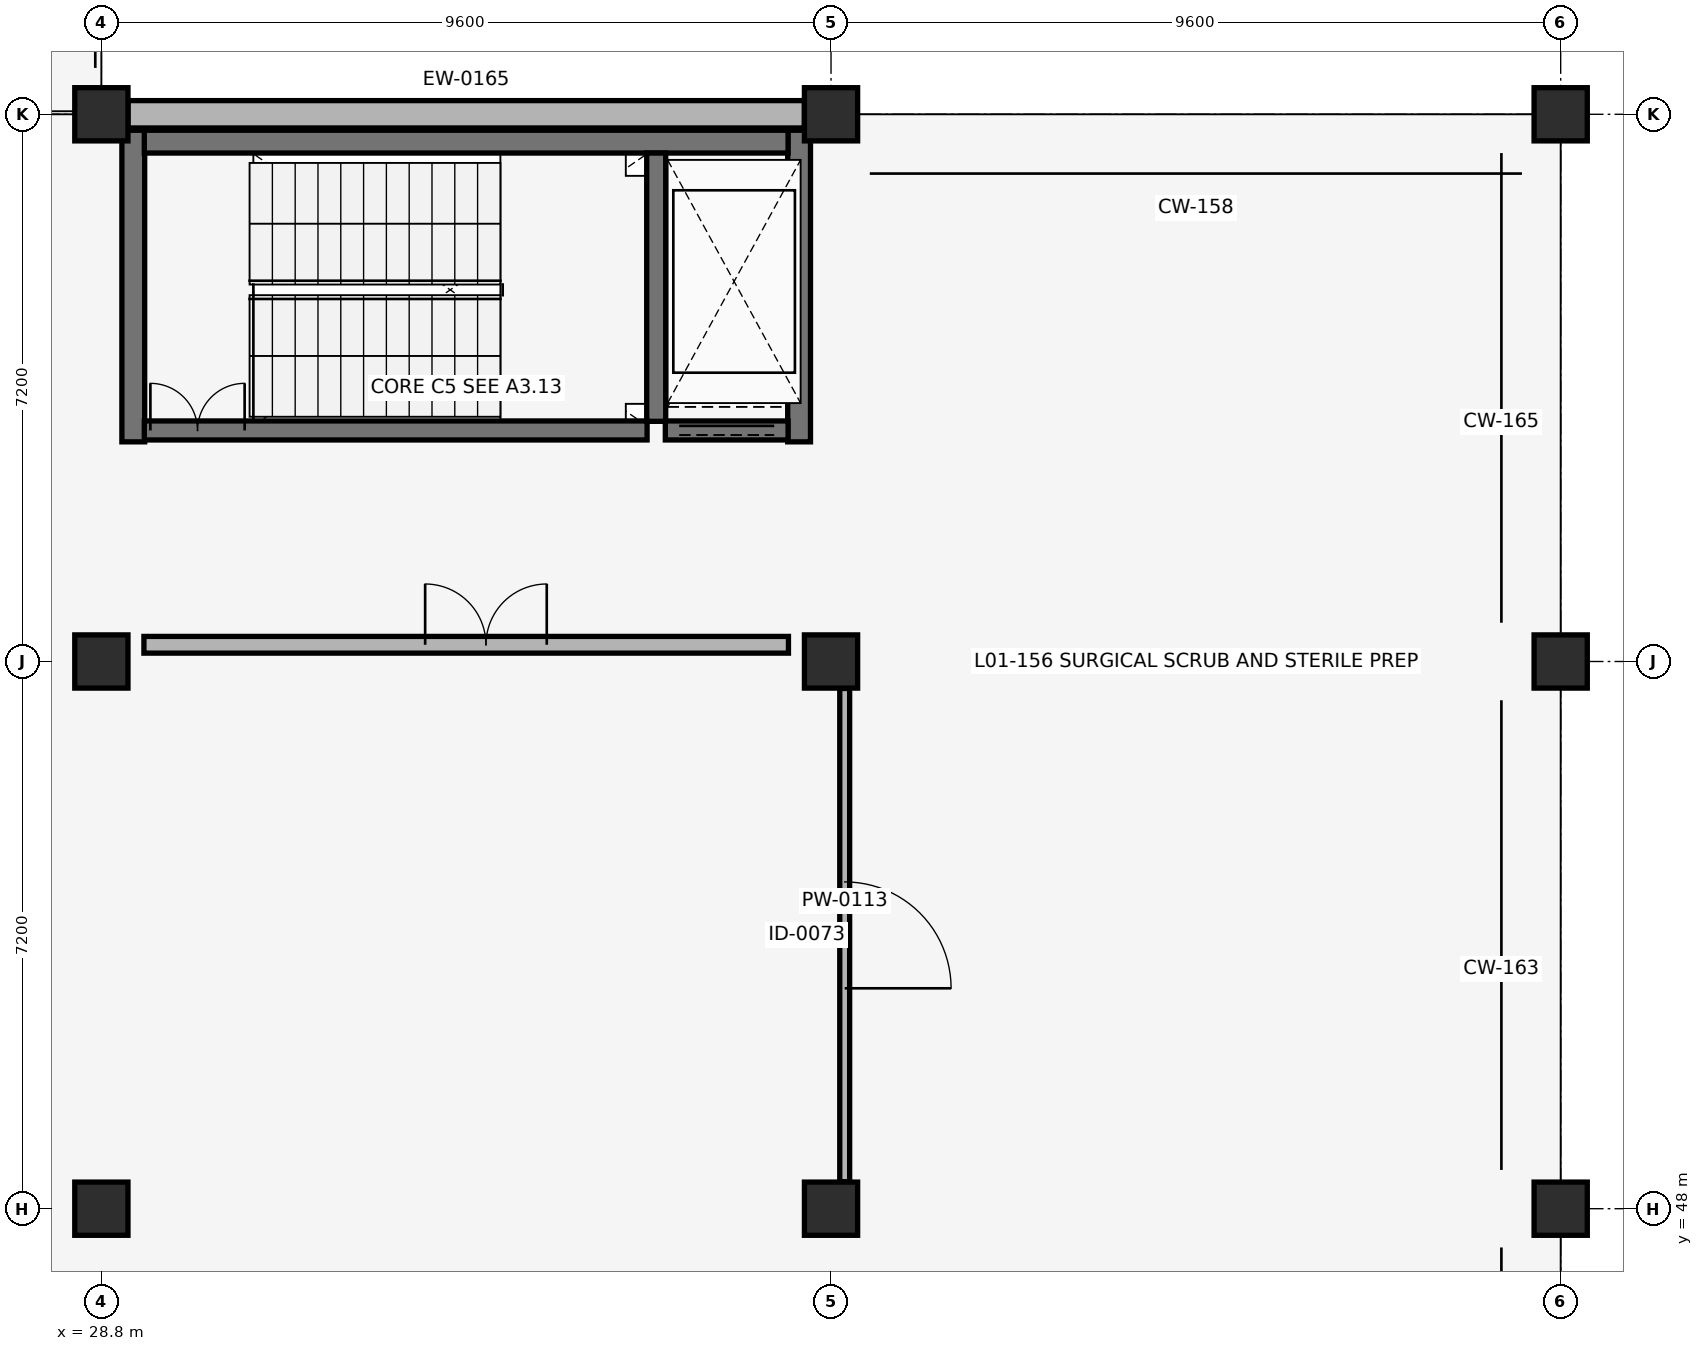
"""IFC4 building model, lengths in metres.
Left out: names, types, materials, properties, quantities, classifications, styles, units other than length and angle.
Written with IfcOpenShell. Run it as: python <this file> out.ifc"""

import sys

from ifc_helpers import new_model, si_unit, direction, frame, frame_2d, origin, origin_2d, place, context, subcontext, project, spatial, rectangle, circle, extrude, element, fill, save


model = new_model("IFC4")
c1 = context("Model", 3, precision=1e-05, world=origin(), true_north=direction((0.0, 1.0)))
c2 = subcontext(c1, "Body", "Model", "MODEL_VIEW")
j1 = project(units=[si_unit("LENGTHUNIT", "METRE"), si_unit("PLANEANGLEUNIT", "RADIAN")], contexts=[c1])
p1 = place(None, origin())
s1 = spatial("IfcSite", under=j1, at=p1, CompositionType="ELEMENT")
p2 = place(p1, origin())
s2 = spatial("IfcBuilding", under=s1, at=p2, CompositionType="ELEMENT")
p3 = place(p2, frame((0.0, 0.0, 4.42)))
s3 = spatial("IfcBuildingStorey", under=s2, at=p3, CompositionType="ELEMENT", Elevation=4.42)
for number, where, z_axis, x_axis in (
    (1, (28.8, 48.0, 0.0), (0.0, 0.0, 1.0), (1.0, 0.0, 0.0)),
    (2, (28.8, 55.2, 0.0), (0.0, 0.0, 1.0), (1.0, 0.0, 0.0)),
    (3, (28.8, 62.4, 0.0), (0.0, 0.0, 1.0), (1.0, 0.0, 0.0)),
    (4, (38.4, 48.0, 0.0), (0.0, 0.0, 1.0), (1.0, 0.0, 0.0)),
    (5, (38.4, 55.2, 0.0), (0.0, 0.0, 1.0), (1.0, 0.0, 0.0)),
    (6, (38.4, 62.4, 0.0), (0.0, 0.0, 1.0), (1.0, 0.0, 0.0)),
    (7, (48.0, 48.0, 0.0), (0.0, 0.0, 1.0), (1.0, 0.0, 0.0)),
    (8, (48.0, 55.2, 0.0), (0.0, 0.0, 1.0), (1.0, 0.0, 0.0)),
    (9, (48.0, 62.4, 0.0), (0.0, 0.0, 1.0), (1.0, 0.0, 0.0)),
):
    element("IfcColumn", number, at=place(p3, frame(where, z_axis=z_axis, x_axis=x_axis)), inside=s3, PredefinedType="COLUMN", context=c2, shape_type="SweptSolid", body=[
        extrude(circle(Radius=0.35, at=origin_2d()), origin(), (0.0, 0.0, 1.0), 4.08),
    ])
p4 = place(p3, frame((38.05, 62.4, 0.0), z_axis=(0.0, 0.0, 1.0), x_axis=(-1.0, 0.0, 0.0)))
e10 = element("IfcWall", 10, at=p4, inside=s3, PredefinedType="SOLIDWALL", context=c2, shape_type="SweptSolid", body=[
    extrude(rectangle(XDim=8.9, YDim=0.36, at=frame_2d((4.45, 0.0))), origin(), (0.0, 0.0, 1.0), 3.06),
])
for number, where, z_axis, x_axis in (
    (11, (29.22, 58.09, 0.0), (0.0, 0.0, 1.0), (0.0, 1.0, 0.0)),
    (12, (37.98, 58.09, 0.0), (0.0, 0.0, 1.0), (0.0, 1.0, 0.0)),
):
    element("IfcWall", number, at=place(p3, frame(where, z_axis=z_axis, x_axis=x_axis)), inside=s3, PredefinedType="SHEAR", context=c2, shape_type="SweptSolid", body=[
        extrude(rectangle(XDim=4.1, YDim=0.3, at=frame_2d((2.05, 0.0))), origin(), (0.0, 0.0, 1.0), 3.78),
    ])
p5 = place(p3, frame((29.365, 62.04, 0.0), z_axis=(0.0, 0.0, 1.0), x_axis=(1.0, 0.0, 0.0)))
e13 = element("IfcWall", 13, at=p5, inside=s3, PredefinedType="SHEAR", context=c2, shape_type="SweptSolid", body=[
    extrude(rectangle(XDim=8.47, YDim=0.3, at=frame_2d((4.235, 0.0))), origin(), (0.0, 0.0, 1.0), 3.78),
])
p6 = place(p3, frame((36.1, 58.36, 0.0), z_axis=(0.0, 0.0, 1.0), x_axis=(0.0, 1.0, 0.0)))
e14 = element("IfcWall", 14, at=p6, inside=s3, PredefinedType="SHEAR", context=c2, shape_type="SweptSolid", body=[
    extrude(rectangle(XDim=3.53, YDim=0.25, at=frame_2d((1.765, 0.0))), origin(), (0.0, 0.0, 1.0), 3.78),
])
p7 = place(p3, frame((29.365, 58.24, 0.0), z_axis=(0.0, 0.0, 1.0), x_axis=(1.0, 0.0, 0.0)))
e15 = element("IfcWall", 15, at=p7, inside=s3, PredefinedType="SHEAR", context=c2, shape_type="SweptSolid", body=[
    extrude(rectangle(XDim=6.615, YDim=0.25, at=frame_2d((3.308, 0.0))), origin(), (0.0, 0.0, 1.0), 3.78),
])
p8 = place(p7, frame((0.08, 0.0, 0.0)))
e16 = element("IfcOpeningElement", 16, at=p8, cuts=e15, PredefinedType="OPENING", context=c2, shape_type="SweptSolid", body=[
    extrude(rectangle(XDim=1.24, YDim=2.15, at=frame_2d((0.62, 1.075))), frame((0.0, 0.135, 0.0), z_axis=(0.0, -1.0, 0.0), x_axis=(1.0, 0.0, 0.0)), (0.0, 0.0, 1.0), 0.27),
])
p9 = place(p3, frame((29.36, 55.42, 0.0), z_axis=(0.0, 0.0, 1.0), x_axis=(1.0, 0.0, 0.0)))
e17 = element("IfcWall", 17, at=p9, inside=s3, PredefinedType="PARTITIONING", context=c2, shape_type="SweptSolid", body=[
    extrude(rectangle(XDim=8.48, YDim=0.22, at=frame_2d((4.24, 0.0))), origin(), (0.0, 0.0, 1.0), 3.11),
])
p10 = place(p9, frame((3.7, 0.0, 0.0)))
e18 = element("IfcOpeningElement", 18, at=p10, cuts=e17, PredefinedType="OPENING", context=c2, shape_type="SweptSolid", body=[
    extrude(rectangle(XDim=1.6, YDim=2.2, at=frame_2d((0.8, 1.1))), frame((0.0, 0.12, 0.0), z_axis=(0.0, -1.0, 0.0), x_axis=(1.0, 0.0, 0.0)), (0.0, 0.0, 1.0), 0.24),
])
p11 = place(p3, frame((36.22, 58.24, 0.0), z_axis=(0.0, 0.0, 1.0), x_axis=(1.0, 0.0, 0.0)))
e19 = element("IfcWall", 19, at=p11, inside=s3, PredefinedType="SHEAR", context=c2, shape_type="SweptSolid", body=[
    extrude(rectangle(XDim=1.615, YDim=0.25, at=frame_2d((0.808, 0.0))), origin(), (0.0, 0.0, 1.0), 3.78),
])
p12 = place(p11, frame((0.183, 0.0, 0.0)))
e20 = element("IfcOpeningElement", 20, at=p12, cuts=e19, PredefinedType="OPENING", context=c2, shape_type="SweptSolid", body=[
    extrude(rectangle(XDim=1.25, YDim=2.15, at=frame_2d((0.625, 1.075))), frame((0.0, 0.135, 0.0), z_axis=(0.0, -1.0, 0.0), x_axis=(1.0, 0.0, 0.0)), (0.0, 0.0, 1.0), 0.27),
])
p13 = place(p3, frame((38.58, 48.355, 0.0), z_axis=(0.0, 0.0, 1.0), x_axis=(0.0, 1.0, 0.0)))
e21 = element("IfcWall", 21, at=p13, inside=s3, PredefinedType="PARTITIONING", context=c2, shape_type="SweptSolid", body=[
    extrude(rectangle(XDim=6.49, YDim=0.13, at=frame_2d((3.245, 0.0))), origin(), (0.0, 0.0, 1.0), 3.05),
])
p14 = place(p13, frame((2.545, 0.0, 0.0)))
e22 = element("IfcOpeningElement", 22, at=p14, cuts=e21, PredefinedType="OPENING", context=c2, shape_type="SweptSolid", body=[
    extrude(rectangle(XDim=1.4, YDim=2.12, at=frame_2d((0.7, 1.06))), frame((0.0, 0.075, 0.0), z_axis=(0.0, -1.0, 0.0), x_axis=(1.0, 0.0, 0.0)), (0.0, 0.0, 1.0), 0.15),
])
p15 = place(p8, origin())
e23 = element("IfcDoor", 23, at=p15, inside=s3, OperationType="DOUBLE_DOOR_SINGLE_SWING", PredefinedType="DOOR", context=c2, shape_type="SweptSolid", body=[
    extrude(rectangle(XDim=1.24, YDim=2.15, at=frame_2d((0.62, 1.075))), frame((0.0, 0.025, 0.0), z_axis=(0.0, -1.0, 0.0), x_axis=(1.0, 0.0, 0.0)), (0.0, 0.0, 1.0), 0.05),
])
fill(e16, e23)
p16 = place(p10, origin())
e24 = element("IfcDoor", 24, at=p16, inside=s3, OperationType="DOUBLE_DOOR_SINGLE_SWING", PredefinedType="DOOR", context=c2, shape_type="SweptSolid", body=[
    extrude(rectangle(XDim=1.6, YDim=2.2, at=frame_2d((0.8, 1.1))), frame((0.0, 0.025, 0.0), z_axis=(0.0, -1.0, 0.0), x_axis=(1.0, 0.0, 0.0)), (0.0, 0.0, 1.0), 0.05),
])
fill(e18, e24)
p17 = place(p12, origin())
e25 = element("IfcDoor", 25, at=p17, inside=s3, OperationType="DOUBLE_DOOR_SLIDING", PredefinedType="DOOR", context=c2, shape_type="SweptSolid", body=[
    extrude(rectangle(XDim=1.25, YDim=2.15, at=frame_2d((0.625, 1.075))), frame((0.0, 0.025, 0.0), z_axis=(0.0, -1.0, 0.0), x_axis=(1.0, 0.0, 0.0)), (0.0, 0.0, 1.0), 0.05),
])
fill(e20, e25)
p18 = place(p14, origin())
e26 = element("IfcDoor", 26, at=p18, inside=s3, OperationType="SINGLE_SWING_RIGHT", PredefinedType="DOOR", context=c2, shape_type="SweptSolid", body=[
    extrude(rectangle(XDim=1.4, YDim=2.12, at=frame_2d((0.7, 1.06))), frame((0.0, 0.025, 0.0), z_axis=(0.0, -1.0, 0.0), x_axis=(1.0, 0.0, 0.0)), (0.0, 0.0, 1.0), 0.05),
])
fill(e22, e26)
save(model, sys.argv[1])
